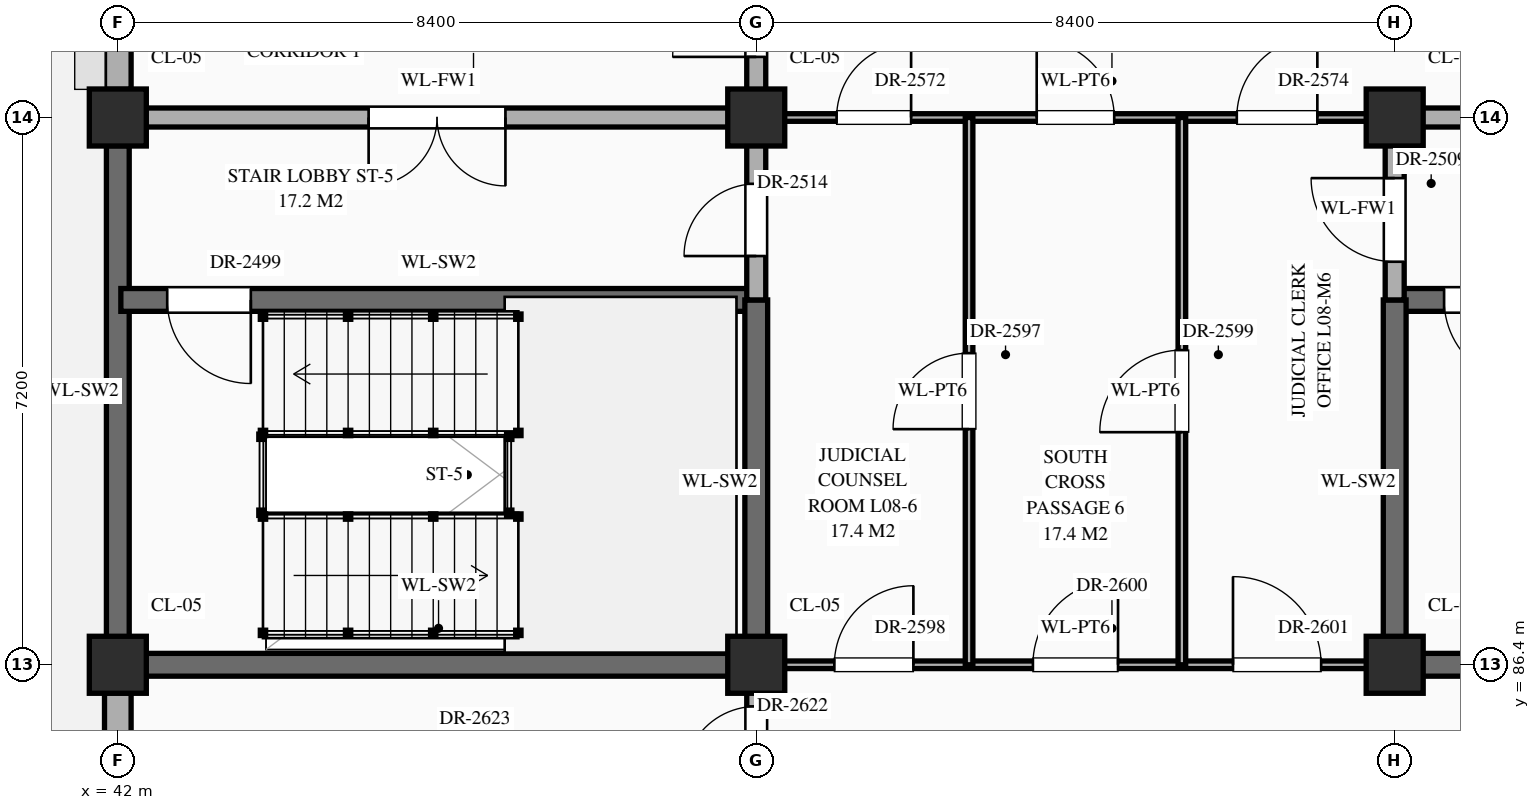
"""IFC4 building model, lengths in metres.
Left out: names, types, materials, properties, quantities, classifications, styles, units other than length and angle.
Written with IfcOpenShell. Run it as: python <this file> out.ifc"""

import sys

from ifc_helpers import new_model, si_unit, direction, frame, frame_2d, origin, origin_2d, place, context, subcontext, project, spatial, rectangle, extrude, element, fill, save


model = new_model("IFC4")
c1 = context("Model", 3, precision=1e-05, world=origin(), true_north=direction((0.0, 1.0)))
c2 = subcontext(c1, "Body", "Model", "MODEL_VIEW")
j1 = project(units=[si_unit("LENGTHUNIT", "METRE"), si_unit("PLANEANGLEUNIT", "RADIAN")], contexts=[c1])
p1 = place(None, origin())
s1 = spatial("IfcSite", under=j1, at=p1, CompositionType="ELEMENT")
p2 = place(p1, origin())
s2 = spatial("IfcBuilding", under=s1, at=p2, CompositionType="ELEMENT")
p3 = place(p2, frame((0.0, 0.0, 35.1)))
s3 = spatial("IfcBuildingStorey", under=s2, at=p3, CompositionType="ELEMENT", Elevation=35.1)
for number, where, z_axis, x_axis in (
    (1, (42.0, 86.4, 0.0), (0.0, 0.0, 1.0), (1.0, 0.0, 0.0)),
    (2, (42.0, 93.6, 0.0), (0.0, 0.0, 1.0), (1.0, 0.0, 0.0)),
    (3, (50.4, 86.4, 0.0), (0.0, 0.0, 1.0), (1.0, 0.0, 0.0)),
    (4, (50.4, 93.6, 0.0), (0.0, 0.0, 1.0), (1.0, 0.0, 0.0)),
    (5, (58.8, 86.4, 0.0), (0.0, 0.0, 1.0), (1.0, 0.0, 0.0)),
    (6, (58.8, 93.6, 0.0), (0.0, 0.0, 1.0), (1.0, 0.0, 0.0)),
):
    element("IfcColumn", number, at=place(p3, frame(where, z_axis=z_axis, x_axis=x_axis)), inside=s3, PredefinedType="COLUMN", context=c2, shape_type="SweptSolid", body=[
        extrude(rectangle(XDim=0.75, YDim=0.75, at=origin_2d()), origin(), (0.0, 0.0, 1.0), 4.2),
    ])
p4 = place(p3, frame((42.0, 79.57, 0.0), z_axis=(0.0, 0.0, 1.0), x_axis=(0.0, 1.0, 0.0)))
e7 = element("IfcWall", 7, at=p4, inside=s3, PredefinedType="STANDARD", context=c2, shape_type="SweptSolid", body=[
    extrude(rectangle(XDim=6.46, YDim=0.35, at=frame_2d((3.23, 0.0))), origin(), (0.0, 0.0, 1.0), 3.3),
])
p5 = place(p4, frame((1.13, 0.0, 0.0)))
e8 = element("IfcOpeningElement", 8, at=p5, cuts=e7, PredefinedType="OPENING", context=c2, shape_type="SweptSolid", body=[
    extrude(rectangle(XDim=1.8, YDim=2.25, at=frame_2d((0.9, 1.125))), frame((0.0, 0.187, 0.0), z_axis=(0.0, -1.0, 0.0), x_axis=(1.0, 0.0, 0.0)), (0.0, 0.0, 1.0), 0.374),
])
p6 = place(p3, frame((42.0, 86.77, 0.0), z_axis=(0.0, 0.0, 1.0), x_axis=(0.0, 1.0, 0.0)))
e9 = element("IfcWall", 9, at=p6, inside=s3, PredefinedType="SHEAR", context=c2, shape_type="SweptSolid", body=[
    extrude(rectangle(XDim=6.46, YDim=0.3, at=frame_2d((3.23, 0.0))), origin(), (0.0, 0.0, 1.0), 3.95),
])
p7 = place(p3, frame((42.0, 93.97, 0.0), z_axis=(0.0, 0.0, 1.0), x_axis=(0.0, 1.0, 0.0)))
e10 = element("IfcWall", 10, at=p7, inside=s3, PredefinedType="STANDARD", context=c2, shape_type="SweptSolid", body=[
    extrude(rectangle(XDim=6.46, YDim=0.35, at=frame_2d((3.23, 0.0))), origin(), (0.0, 0.0, 1.0), 3.3),
])
p8 = place(p7, frame((4.08, 0.0, 0.85)))
e11 = element("IfcOpeningElement", 11, at=p8, cuts=e10, PredefinedType="OPENING", context=c2, shape_type="SweptSolid", body=[
    extrude(rectangle(XDim=0.9, YDim=1.56, at=frame_2d((0.45, 0.78))), frame((0.0, 0.187, 0.0), z_axis=(0.0, -1.0, 0.0), x_axis=(1.0, 0.0, 0.0)), (0.0, 0.0, 1.0), 0.374),
])
p9 = place(p3, frame((42.04, 86.4, 0.0), z_axis=(0.0, 0.0, 1.0), x_axis=(1.0, 0.0, 0.0)))
e12 = element("IfcWall", 12, at=p9, inside=s3, PredefinedType="SHEAR", context=c2, shape_type="SweptSolid", body=[
    extrude(rectangle(XDim=8.36, YDim=0.3, at=frame_2d((4.18, 0.0))), origin(), (0.0, 0.0, 1.0), 3.95),
])
p10 = place(p3, frame((50.4, 86.4, 0.0), z_axis=(0.0, 0.0, 1.0), x_axis=(1.0, 0.0, 0.0)))
e13 = element("IfcWall", 13, at=p10, inside=s3, PredefinedType="STANDARD", context=c2, shape_type="SweptSolid", body=[
    extrude(rectangle(XDim=8.4, YDim=0.1, at=frame_2d((4.2, 0.0))), origin(), (0.0, 0.0, 1.0), 3.1),
])
p11 = place(p10, frame((1.028, 0.0, 0.0)))
e14 = element("IfcOpeningElement", 14, at=p11, cuts=e13, PredefinedType="OPENING", context=c2, shape_type="SweptSolid", body=[
    extrude(rectangle(XDim=1.04, YDim=2.2, at=frame_2d((0.52, 1.1))), frame((0.0, 0.062, 0.0), z_axis=(0.0, -1.0, 0.0), x_axis=(1.0, 0.0, 0.0)), (0.0, 0.0, 1.0), 0.124),
])
p12 = place(p10, frame((3.64, 0.0, 0.0)))
e15 = element("IfcOpeningElement", 15, at=p12, cuts=e13, PredefinedType="OPENING", context=c2, shape_type="SweptSolid", body=[
    extrude(rectangle(XDim=1.12, YDim=2.25, at=frame_2d((0.56, 1.125))), frame((0.0, 0.062, 0.0), z_axis=(0.0, -1.0, 0.0), x_axis=(1.0, 0.0, 0.0)), (0.0, 0.0, 1.0), 0.124),
])
p13 = place(p10, frame((6.272, 0.0, 0.0)))
e16 = element("IfcOpeningElement", 16, at=p13, cuts=e13, PredefinedType="OPENING", context=c2, shape_type="SweptSolid", body=[
    extrude(rectangle(XDim=1.16, YDim=2.3, at=frame_2d((0.58, 1.15))), frame((0.0, 0.062, 0.0), z_axis=(0.0, -1.0, 0.0), x_axis=(1.0, 0.0, 0.0)), (0.0, 0.0, 1.0), 0.124),
])
p14 = place(p3, frame((58.8, 86.4, 0.0), z_axis=(0.0, 0.0, 1.0), x_axis=(1.0, 0.0, 0.0)))
e17 = element("IfcWall", 17, at=p14, inside=s3, PredefinedType="SHEAR", context=c2, shape_type="SweptSolid", body=[
    extrude(rectangle(XDim=8.4, YDim=0.3, at=frame_2d((4.2, 0.0))), origin(), (0.0, 0.0, 1.0), 3.95),
])
p15 = place(p3, frame((42.04, 91.2, 0.0), z_axis=(0.0, 0.0, 1.0), x_axis=(1.0, 0.0, 0.0)))
e18 = element("IfcWall", 18, at=p15, inside=s3, PredefinedType="SHEAR", context=c2, shape_type="SweptSolid", body=[
    extrude(rectangle(XDim=8.36, YDim=0.3, at=frame_2d((4.18, 0.0))), origin(), (0.0, 0.0, 1.0), 3.95),
])
p16 = place(p15, frame((0.61, 0.0, 0.0)))
e19 = element("IfcOpeningElement", 19, at=p16, cuts=e18, PredefinedType="OPENING", context=c2, shape_type="SweptSolid", body=[
    extrude(rectangle(XDim=1.1, YDim=2.2, at=frame_2d((0.55, 1.1))), frame((0.0, 0.162, 0.0), z_axis=(0.0, -1.0, 0.0), x_axis=(1.0, 0.0, 0.0)), (0.0, 0.0, 1.0), 0.324),
])
p17 = place(p3, frame((58.8, 91.2, 0.0), z_axis=(0.0, 0.0, 1.0), x_axis=(1.0, 0.0, 0.0)))
e20 = element("IfcWall", 20, at=p17, inside=s3, PredefinedType="SHEAR", context=c2, shape_type="SweptSolid", body=[
    extrude(rectangle(XDim=8.4, YDim=0.3, at=frame_2d((4.2, 0.0))), origin(), (0.0, 0.0, 1.0), 3.95),
])
p18 = place(p17, frame((0.65, 0.0, 0.0)))
e21 = element("IfcOpeningElement", 21, at=p18, cuts=e20, PredefinedType="OPENING", context=c2, shape_type="SweptSolid", body=[
    extrude(rectangle(XDim=1.1, YDim=2.2, at=frame_2d((0.55, 1.1))), frame((0.0, 0.162, 0.0), z_axis=(0.0, -1.0, 0.0), x_axis=(1.0, 0.0, 0.0)), (0.0, 0.0, 1.0), 0.324),
])
p19 = place(p3, frame((42.04, 93.6, 0.0), z_axis=(0.0, 0.0, 1.0), x_axis=(1.0, 0.0, 0.0)))
e22 = element("IfcWall", 22, at=p19, inside=s3, PredefinedType="STANDARD", context=c2, shape_type="SweptSolid", body=[
    extrude(rectangle(XDim=8.36, YDim=0.25, at=frame_2d((4.18, 0.0))), origin(), (0.0, 0.0, 1.0), 3.1),
])
p20 = place(p19, frame((3.26, 0.0, 0.0)))
e23 = element("IfcOpeningElement", 23, at=p20, cuts=e22, PredefinedType="OPENING", context=c2, shape_type="SweptSolid", body=[
    extrude(rectangle(XDim=1.8, YDim=2.35, at=frame_2d((0.9, 1.175))), frame((0.0, 0.137, 0.0), z_axis=(0.0, -1.0, 0.0), x_axis=(1.0, 0.0, 0.0)), (0.0, 0.0, 1.0), 0.274),
])
p21 = place(p3, frame((50.4, 93.6, 0.0), z_axis=(0.0, 0.0, 1.0), x_axis=(1.0, 0.0, 0.0)))
e24 = element("IfcWall", 24, at=p21, inside=s3, PredefinedType="STANDARD", context=c2, shape_type="SweptSolid", body=[
    extrude(rectangle(XDim=8.4, YDim=0.1, at=frame_2d((4.2, 0.0))), origin(), (0.0, 0.0, 1.0), 3.1),
])
p22 = place(p21, frame((1.058, 0.0, 0.0)))
e25 = element("IfcOpeningElement", 25, at=p22, cuts=e24, PredefinedType="OPENING", context=c2, shape_type="SweptSolid", body=[
    extrude(rectangle(XDim=0.98, YDim=2.35, at=frame_2d((0.49, 1.175))), frame((0.0, 0.062, 0.0), z_axis=(0.0, -1.0, 0.0), x_axis=(1.0, 0.0, 0.0)), (0.0, 0.0, 1.0), 0.124),
])
p23 = place(p21, frame((3.69, 0.0, 0.0)))
e26 = element("IfcOpeningElement", 26, at=p23, cuts=e24, PredefinedType="OPENING", context=c2, shape_type="SweptSolid", body=[
    extrude(rectangle(XDim=1.02, YDim=2.4, at=frame_2d((0.51, 1.2))), frame((0.0, 0.062, 0.0), z_axis=(0.0, -1.0, 0.0), x_axis=(1.0, 0.0, 0.0)), (0.0, 0.0, 1.0), 0.124),
])
p24 = place(p21, frame((6.323, 0.0, 0.0)))
e27 = element("IfcOpeningElement", 27, at=p24, cuts=e24, PredefinedType="OPENING", context=c2, shape_type="SweptSolid", body=[
    extrude(rectangle(XDim=1.06, YDim=2.4, at=frame_2d((0.53, 1.2))), frame((0.0, 0.062, 0.0), z_axis=(0.0, -1.0, 0.0), x_axis=(1.0, 0.0, 0.0)), (0.0, 0.0, 1.0), 0.124),
])
p25 = place(p3, frame((58.8, 93.6, 0.0), z_axis=(0.0, 0.0, 1.0), x_axis=(1.0, 0.0, 0.0)))
e28 = element("IfcWall", 28, at=p25, inside=s3, PredefinedType="STANDARD", context=c2, shape_type="SweptSolid", body=[
    extrude(rectangle(XDim=8.4, YDim=0.25, at=frame_2d((4.2, 0.0))), origin(), (0.0, 0.0, 1.0), 3.1),
])
p26 = place(p25, frame((3.4, 0.0, 0.0)))
e29 = element("IfcOpeningElement", 29, at=p26, cuts=e28, PredefinedType="OPENING", context=c2, shape_type="SweptSolid", body=[
    extrude(rectangle(XDim=1.6, YDim=2.3, at=frame_2d((0.8, 1.15))), frame((0.0, 0.137, 0.0), z_axis=(0.0, -1.0, 0.0), x_axis=(1.0, 0.0, 0.0)), (0.0, 0.0, 1.0), 0.274),
])
p27 = place(p3, frame((50.4, 79.24, 0.0), z_axis=(0.0, 0.0, 1.0), x_axis=(0.0, 1.0, 0.0)))
e30 = element("IfcWall", 30, at=p27, inside=s3, PredefinedType="STANDARD", context=c2, shape_type="SweptSolid", body=[
    extrude(rectangle(XDim=7.16, YDim=0.25, at=frame_2d((3.58, 0.0))), origin(), (0.0, 0.0, 1.0), 3.2),
])
p28 = place(p27, frame((5.663, 0.0, 0.0)))
e31 = element("IfcOpeningElement", 31, at=p28, cuts=e30, PredefinedType="OPENING", context=c2, shape_type="SweptSolid", body=[
    extrude(rectangle(XDim=0.95, YDim=2.15, at=frame_2d((0.475, 1.075))), frame((0.0, 0.137, 0.0), z_axis=(0.0, -1.0, 0.0), x_axis=(1.0, 0.0, 0.0)), (0.0, 0.0, 1.0), 0.274),
])
p29 = place(p27, frame((1.833, 0.0, 0.0)))
e32 = element("IfcOpeningElement", 32, at=p29, cuts=e30, PredefinedType="OPENING", context=c2, shape_type="SweptSolid", body=[
    extrude(rectangle(XDim=2.0, YDim=2.4, at=frame_2d((1.0, 1.2))), frame((0.0, 0.137, 0.0), z_axis=(0.0, -1.0, 0.0), x_axis=(1.0, 0.0, 0.0)), (0.0, 0.0, 1.0), 0.274),
])
p30 = place(p3, frame((50.4, 86.4, 0.0), z_axis=(0.0, 0.0, 1.0), x_axis=(0.0, 1.0, 0.0)))
e33 = element("IfcWall", 33, at=p30, inside=s3, PredefinedType="SHEAR", context=c2, shape_type="SweptSolid", body=[
    extrude(rectangle(XDim=4.8, YDim=0.3, at=frame_2d((2.4, 0.0))), origin(), (0.0, 0.0, 1.0), 3.95),
])
p31 = place(p3, frame((50.4, 91.2, 0.0), z_axis=(0.0, 0.0, 1.0), x_axis=(0.0, 1.0, 0.0)))
e34 = element("IfcWall", 34, at=p31, inside=s3, PredefinedType="STANDARD", context=c2, shape_type="SweptSolid", body=[
    extrude(rectangle(XDim=13.2, YDim=0.25, at=frame_2d((6.6, 0.0))), origin(), (0.0, 0.0, 1.0), 3.2),
])
p32 = place(p31, frame((0.577, 0.0, 0.0)))
e35 = element("IfcOpeningElement", 35, at=p32, cuts=e34, PredefinedType="OPENING", context=c2, shape_type="SweptSolid", body=[
    extrude(rectangle(XDim=0.95, YDim=2.15, at=frame_2d((0.475, 1.075))), frame((0.0, 0.137, 0.0), z_axis=(0.0, -1.0, 0.0), x_axis=(1.0, 0.0, 0.0)), (0.0, 0.0, 1.0), 0.274),
])
p33 = place(p31, frame((10.472, 0.0, 0.0)))
e36 = element("IfcOpeningElement", 36, at=p33, cuts=e34, PredefinedType="OPENING", context=c2, shape_type="SweptSolid", body=[
    extrude(rectangle(XDim=0.95, YDim=2.15, at=frame_2d((0.475, 1.075))), frame((0.0, 0.137, 0.0), z_axis=(0.0, -1.0, 0.0), x_axis=(1.0, 0.0, 0.0)), (0.0, 0.0, 1.0), 0.274),
])
p34 = place(p31, frame((3.198, 0.0, 0.0)))
e37 = element("IfcOpeningElement", 37, at=p34, cuts=e34, PredefinedType="OPENING", context=c2, shape_type="SweptSolid", body=[
    extrude(rectangle(XDim=1.1, YDim=2.2, at=frame_2d((0.55, 1.1))), frame((0.0, 0.137, 0.0), z_axis=(0.0, -1.0, 0.0), x_axis=(1.0, 0.0, 0.0)), (0.0, 0.0, 1.0), 0.274),
])
p35 = place(p3, frame((53.2, 86.4, 0.0), z_axis=(0.0, 0.0, 1.0), x_axis=(0.0, 1.0, 0.0)))
e38 = element("IfcWall", 38, at=p35, inside=s3, PredefinedType="STANDARD", context=c2, shape_type="SweptSolid", body=[
    extrude(rectangle(XDim=7.2, YDim=0.1, at=frame_2d((3.6, 0.0))), origin(), (0.0, 0.0, 1.0), 3.95),
])
p36 = place(p35, frame((3.1, 0.0, 0.0)))
e39 = element("IfcOpeningElement", 39, at=p36, cuts=e38, PredefinedType="OPENING", context=c2, shape_type="SweptSolid", body=[
    extrude(rectangle(XDim=1.0, YDim=2.25, at=frame_2d((0.5, 1.125))), frame((0.0, 0.062, 0.0), z_axis=(0.0, -1.0, 0.0), x_axis=(1.0, 0.0, 0.0)), (0.0, 0.0, 1.0), 0.124),
])
p37 = place(p3, frame((56.0, 86.4, 0.0), z_axis=(0.0, 0.0, 1.0), x_axis=(0.0, 1.0, 0.0)))
e40 = element("IfcWall", 40, at=p37, inside=s3, PredefinedType="STANDARD", context=c2, shape_type="SweptSolid", body=[
    extrude(rectangle(XDim=7.2, YDim=0.1, at=frame_2d((3.6, 0.0))), origin(), (0.0, 0.0, 1.0), 3.95),
])
p38 = place(p37, frame((3.06, 0.0, 0.0)))
e41 = element("IfcOpeningElement", 41, at=p38, cuts=e40, PredefinedType="OPENING", context=c2, shape_type="SweptSolid", body=[
    extrude(rectangle(XDim=1.08, YDim=2.25, at=frame_2d((0.54, 1.125))), frame((0.0, 0.062, 0.0), z_axis=(0.0, -1.0, 0.0), x_axis=(1.0, 0.0, 0.0)), (0.0, 0.0, 1.0), 0.124),
])
p39 = place(p3, frame((58.8, 86.4, 0.0), z_axis=(0.0, 0.0, 1.0), x_axis=(0.0, 1.0, 0.0)))
e42 = element("IfcWall", 42, at=p39, inside=s3, PredefinedType="SHEAR", context=c2, shape_type="SweptSolid", body=[
    extrude(rectangle(XDim=4.8, YDim=0.3, at=frame_2d((2.4, 0.0))), origin(), (0.0, 0.0, 1.0), 3.95),
])
p40 = place(p3, frame((58.8, 91.2, 0.0), z_axis=(0.0, 0.0, 1.0), x_axis=(0.0, 1.0, 0.0)))
e43 = element("IfcWall", 43, at=p40, inside=s3, PredefinedType="STANDARD", context=c2, shape_type="SweptSolid", body=[
    extrude(rectangle(XDim=2.4, YDim=0.25, at=frame_2d((1.2, 0.0))), origin(), (0.0, 0.0, 1.0), 3.2),
])
p41 = place(p40, frame((0.502, 0.0, 0.0)))
e44 = element("IfcOpeningElement", 44, at=p41, cuts=e43, PredefinedType="OPENING", context=c2, shape_type="SweptSolid", body=[
    extrude(rectangle(XDim=1.1, YDim=2.2, at=frame_2d((0.55, 1.1))), frame((0.0, 0.137, 0.0), z_axis=(0.0, -1.0, 0.0), x_axis=(1.0, 0.0, 0.0)), (0.0, 0.0, 1.0), 0.274),
])
p42 = place(p18, frame((1.1, 0.0, 0.0), z_axis=(0.0, 0.0, 1.0), x_axis=(-1.0, 0.0, 0.0)))
e45 = element("IfcDoor", 45, at=p42, inside=s3, OperationType="SINGLE_SWING_LEFT", PredefinedType="DOOR", context=c2, shape_type="SweptSolid", body=[
    extrude(rectangle(XDim=1.1, YDim=2.2, at=frame_2d((0.55, 1.1))), frame((0.0, 0.025, 0.0), z_axis=(0.0, -1.0, 0.0), x_axis=(1.0, 0.0, 0.0)), (0.0, 0.0, 1.0), 0.05),
])
fill(e21, e45)
p43 = place(p16, frame((1.1, 0.0, 0.0), z_axis=(0.0, 0.0, 1.0), x_axis=(-1.0, 0.0, 0.0)))
e46 = element("IfcDoor", 46, at=p43, inside=s3, OperationType="SINGLE_SWING_LEFT", PredefinedType="DOOR", context=c2, shape_type="SweptSolid", body=[
    extrude(rectangle(XDim=1.1, YDim=2.2, at=frame_2d((0.55, 1.1))), frame((0.0, 0.025, 0.0), z_axis=(0.0, -1.0, 0.0), x_axis=(1.0, 0.0, 0.0)), (0.0, 0.0, 1.0), 0.05),
])
fill(e19, e46)
p44 = place(p41, origin())
e47 = element("IfcDoor", 47, at=p44, inside=s3, OperationType="SINGLE_SWING_RIGHT", PredefinedType="DOOR", context=c2, shape_type="SweptSolid", body=[
    extrude(rectangle(XDim=1.1, YDim=2.2, at=frame_2d((0.55, 1.1))), frame((0.0, 0.025, 0.0), z_axis=(0.0, -1.0, 0.0), x_axis=(1.0, 0.0, 0.0)), (0.0, 0.0, 1.0), 0.05),
])
fill(e44, e47)
p45 = place(p20, frame((1.8, 0.0, 0.0), z_axis=(0.0, 0.0, 1.0), x_axis=(-1.0, 0.0, 0.0)))
e48 = element("IfcDoor", 48, at=p45, inside=s3, OperationType="DOUBLE_DOOR_SINGLE_SWING", PredefinedType="DOOR", context=c2, shape_type="SweptSolid", body=[
    extrude(rectangle(XDim=1.8, YDim=2.35, at=frame_2d((0.9, 1.175))), frame((0.0, 0.025, 0.0), z_axis=(0.0, -1.0, 0.0), x_axis=(1.0, 0.0, 0.0)), (0.0, 0.0, 1.0), 0.05),
])
fill(e23, e48)
p46 = place(p32, origin())
e49 = element("IfcDoor", 49, at=p46, inside=s3, OperationType="SINGLE_SWING_LEFT", PredefinedType="DOOR", context=c2, shape_type="SweptSolid", body=[
    extrude(rectangle(XDim=0.95, YDim=2.15, at=frame_2d((0.475, 1.075))), frame((0.0, 0.025, 0.0), z_axis=(0.0, -1.0, 0.0), x_axis=(1.0, 0.0, 0.0)), (0.0, 0.0, 1.0), 0.05),
])
fill(e35, e49)
p47 = place(p34, origin())
e50 = element("IfcDoor", 50, at=p47, inside=s3, OperationType="SINGLE_SWING_LEFT", PredefinedType="DOOR", context=c2, shape_type="SweptSolid", body=[
    extrude(rectangle(XDim=1.1, YDim=2.2, at=frame_2d((0.55, 1.1))), frame((0.0, 0.025, 0.0), z_axis=(0.0, -1.0, 0.0), x_axis=(1.0, 0.0, 0.0)), (0.0, 0.0, 1.0), 0.05),
])
fill(e37, e50)
p48 = place(p22, origin())
e51 = element("IfcDoor", 51, at=p48, inside=s3, OperationType="SINGLE_SWING_RIGHT", PredefinedType="DOOR", context=c2, shape_type="SweptSolid", body=[
    extrude(rectangle(XDim=0.98, YDim=2.35, at=frame_2d((0.49, 1.175))), frame((0.0, 0.025, 0.0), z_axis=(0.0, -1.0, 0.0), x_axis=(1.0, 0.0, 0.0)), (0.0, 0.0, 1.0), 0.05),
])
fill(e25, e51)
p49 = place(p23, origin())
e52 = element("IfcDoor", 52, at=p49, inside=s3, OperationType="SINGLE_SWING_LEFT", PredefinedType="DOOR", context=c2, shape_type="SweptSolid", body=[
    extrude(rectangle(XDim=1.02, YDim=2.4, at=frame_2d((0.51, 1.2))), frame((0.0, 0.025, 0.0), z_axis=(0.0, -1.0, 0.0), x_axis=(1.0, 0.0, 0.0)), (0.0, 0.0, 1.0), 0.05),
])
fill(e26, e52)
p50 = place(p24, origin())
e53 = element("IfcDoor", 53, at=p50, inside=s3, OperationType="SINGLE_SWING_RIGHT", PredefinedType="DOOR", context=c2, shape_type="SweptSolid", body=[
    extrude(rectangle(XDim=1.06, YDim=2.4, at=frame_2d((0.53, 1.2))), frame((0.0, 0.025, 0.0), z_axis=(0.0, -1.0, 0.0), x_axis=(1.0, 0.0, 0.0)), (0.0, 0.0, 1.0), 0.05),
])
fill(e27, e53)
p51 = place(p36, origin())
e54 = element("IfcDoor", 54, at=p51, inside=s3, OperationType="SINGLE_SWING_LEFT", PredefinedType="DOOR", context=c2, shape_type="SweptSolid", body=[
    extrude(rectangle(XDim=1.0, YDim=2.25, at=frame_2d((0.5, 1.125))), frame((0.0, 0.025, 0.0), z_axis=(0.0, -1.0, 0.0), x_axis=(1.0, 0.0, 0.0)), (0.0, 0.0, 1.0), 0.05),
])
fill(e39, e54)
p52 = place(p11, origin())
e55 = element("IfcDoor", 55, at=p52, inside=s3, OperationType="SINGLE_SWING_RIGHT", PredefinedType="DOOR", context=c2, shape_type="SweptSolid", body=[
    extrude(rectangle(XDim=1.04, YDim=2.2, at=frame_2d((0.52, 1.1))), frame((0.0, 0.025, 0.0), z_axis=(0.0, -1.0, 0.0), x_axis=(1.0, 0.0, 0.0)), (0.0, 0.0, 1.0), 0.05),
])
fill(e14, e55)
p53 = place(p38, origin())
e56 = element("IfcDoor", 56, at=p53, inside=s3, OperationType="SINGLE_SWING_LEFT", PredefinedType="DOOR", context=c2, shape_type="SweptSolid", body=[
    extrude(rectangle(XDim=1.08, YDim=2.25, at=frame_2d((0.54, 1.125))), frame((0.0, 0.025, 0.0), z_axis=(0.0, -1.0, 0.0), x_axis=(1.0, 0.0, 0.0)), (0.0, 0.0, 1.0), 0.05),
])
fill(e41, e56)
p54 = place(p12, origin())
e57 = element("IfcDoor", 57, at=p54, inside=s3, OperationType="SINGLE_SWING_RIGHT", PredefinedType="DOOR", context=c2, shape_type="SweptSolid", body=[
    extrude(rectangle(XDim=1.12, YDim=2.25, at=frame_2d((0.56, 1.125))), frame((0.0, 0.025, 0.0), z_axis=(0.0, -1.0, 0.0), x_axis=(1.0, 0.0, 0.0)), (0.0, 0.0, 1.0), 0.05),
])
fill(e15, e57)
p55 = place(p13, origin())
e58 = element("IfcDoor", 58, at=p55, inside=s3, OperationType="SINGLE_SWING_LEFT", PredefinedType="DOOR", context=c2, shape_type="SweptSolid", body=[
    extrude(rectangle(XDim=1.16, YDim=2.3, at=frame_2d((0.58, 1.15))), frame((0.0, 0.025, 0.0), z_axis=(0.0, -1.0, 0.0), x_axis=(1.0, 0.0, 0.0)), (0.0, 0.0, 1.0), 0.05),
])
fill(e16, e58)
p56 = place(p28, origin())
e59 = element("IfcDoor", 59, at=p56, inside=s3, OperationType="SINGLE_SWING_LEFT", PredefinedType="DOOR", context=c2, shape_type="SweptSolid", body=[
    extrude(rectangle(XDim=0.95, YDim=2.15, at=frame_2d((0.475, 1.075))), frame((0.0, 0.025, 0.0), z_axis=(0.0, -1.0, 0.0), x_axis=(1.0, 0.0, 0.0)), (0.0, 0.0, 1.0), 0.05),
])
fill(e31, e59)
save(model, sys.argv[1])
